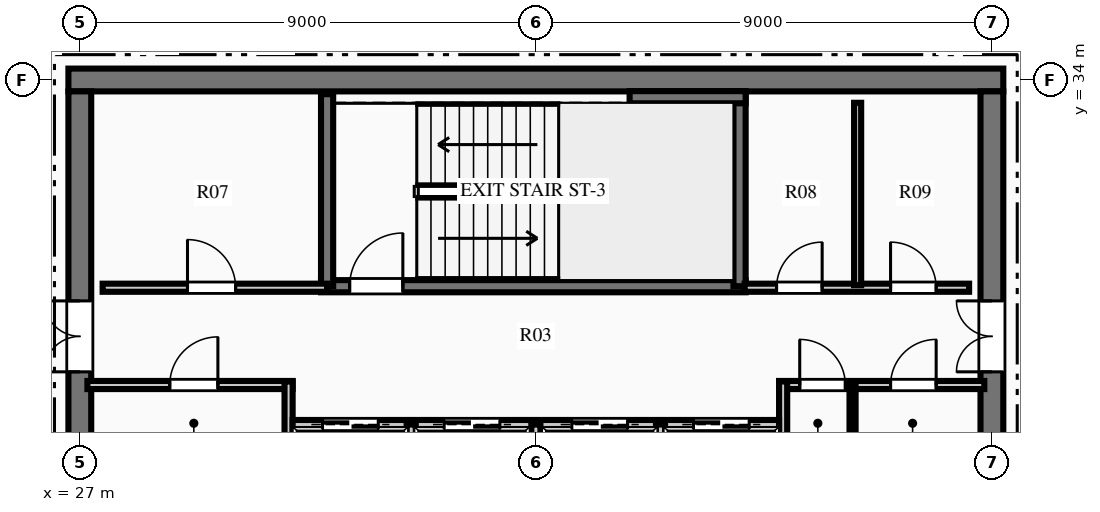
"""IFC4 building model, lengths in metres.
Left out: names, types, materials, properties, quantities, classifications, styles, units other than length and angle.
Written with IfcOpenShell. Run it as: python <this file> out.ifc"""

import sys

from ifc_helpers import new_model, si_unit, direction, frame, frame_2d, origin, place, context, subcontext, project, spatial, rectangle, extrude, element, fill, save


model = new_model("IFC4")
c1 = context("Model", 3, precision=1e-05, world=origin(), true_north=direction((0.0, 1.0)))
c2 = subcontext(c1, "Body", "Model", "MODEL_VIEW")
j1 = project(units=[si_unit("LENGTHUNIT", "METRE"), si_unit("PLANEANGLEUNIT", "RADIAN")], contexts=[c1])
p1 = place(None, origin())
s1 = spatial("IfcSite", under=j1, at=p1, CompositionType="ELEMENT")
p2 = place(p1, origin())
s2 = spatial("IfcBuilding", under=s1, at=p2, CompositionType="ELEMENT")
p3 = place(p2, frame((0.0, 0.0, 289.95)))
s3 = spatial("IfcBuildingStorey", under=s2, at=p3, CompositionType="ELEMENT", Elevation=289.95)
p4 = place(p3, frame((26.775, 34.0, 0.0), z_axis=(0.0, 0.0, 1.0), x_axis=(1.0, 0.0, 0.0)))
e1 = element("IfcWall", 1, at=p4, inside=s3, PredefinedType="SHEAR", context=c2, shape_type="SweptSolid", body=[
    extrude(rectangle(XDim=18.45, YDim=0.45, at=frame_2d((9.225, 0.0))), origin(), (0.0, 0.0, 1.0), 3.75),
])
p5 = place(p3, frame((27.0, 18.225, 0.0), z_axis=(0.0, 0.0, 1.0), x_axis=(0.0, 1.0, 0.0)))
e2 = element("IfcWall", 2, at=p5, inside=s3, PredefinedType="SHEAR", context=c2, shape_type="SweptSolid", body=[
    extrude(rectangle(XDim=15.55, YDim=0.45, at=frame_2d((7.775, 0.0))), origin(), (0.0, 0.0, 1.0), 3.75),
])
p6 = place(p5, frame((10.015, 0.0, 0.0)))
e3 = element("IfcOpeningElement", 3, at=p6, cuts=e2, PredefinedType="OPENING", context=c2, shape_type="SweptSolid", body=[
    extrude(rectangle(XDim=1.4, YDim=2.2, at=frame_2d((0.7, 1.1))), frame((0.0, 0.235, 0.0), z_axis=(0.0, -1.0, 0.0), x_axis=(1.0, 0.0, 0.0)), (0.0, 0.0, 1.0), 0.47),
])
p7 = place(p3, frame((45.0, 18.225, 0.0), z_axis=(0.0, 0.0, 1.0), x_axis=(0.0, 1.0, 0.0)))
e4 = element("IfcWall", 4, at=p7, inside=s3, PredefinedType="SHEAR", context=c2, shape_type="SweptSolid", body=[
    extrude(rectangle(XDim=15.55, YDim=0.45, at=frame_2d((7.775, 0.0))), origin(), (0.0, 0.0, 1.0), 3.75),
])
p8 = place(p7, frame((10.015, 0.0, 0.0)))
e5 = element("IfcOpeningElement", 5, at=p8, cuts=e4, PredefinedType="OPENING", context=c2, shape_type="SweptSolid", body=[
    extrude(rectangle(XDim=1.4, YDim=2.2, at=frame_2d((0.7, 1.1))), frame((0.0, 0.235, 0.0), z_axis=(0.0, -1.0, 0.0), x_axis=(1.0, 0.0, 0.0)), (0.0, 0.0, 1.0), 0.47),
])
p9 = place(p3, frame((31.76, 29.93, 0.0), z_axis=(0.0, 0.0, 1.0), x_axis=(1.0, 0.0, 0.0)))
e6 = element("IfcWall", 6, at=p9, inside=s3, PredefinedType="SHEAR", context=c2, shape_type="SweptSolid", body=[
    extrude(rectangle(XDim=8.38, YDim=0.24, at=frame_2d((4.19, 0.0))), origin(), (0.0, 0.0, 1.0), 3.75),
])
p10 = place(p9, frame((0.565, 0.0, 0.0)))
e7 = element("IfcOpeningElement", 7, at=p10, cuts=e6, PredefinedType="OPENING", context=c2, shape_type="SweptSolid", body=[
    extrude(rectangle(XDim=1.05, YDim=2.15, at=frame_2d((0.525, 1.075))), frame((0.0, 0.13, 0.0), z_axis=(0.0, -1.0, 0.0), x_axis=(1.0, 0.0, 0.0)), (0.0, 0.0, 1.0), 0.26),
])
p11 = place(p3, frame((31.88, 29.93, 0.0), z_axis=(0.0, 0.0, 1.0), x_axis=(0.0, 1.0, 0.0)))
e8 = element("IfcWall", 8, at=p11, inside=s3, PredefinedType="SHEAR", context=c2, shape_type="SweptSolid", body=[
    extrude(rectangle(XDim=3.79, YDim=0.24, at=frame_2d((1.895, 0.0))), origin(), (0.0, 0.0, 1.0), 3.75),
])
p12 = place(p3, frame((40.02, 29.93, 0.0), z_axis=(0.0, 0.0, 1.0), x_axis=(0.0, 1.0, 0.0)))
e9 = element("IfcWall", 9, at=p12, inside=s3, PredefinedType="SHEAR", context=c2, shape_type="SweptSolid", body=[
    extrude(rectangle(XDim=3.85, YDim=0.24, at=frame_2d((1.925, 0.0))), origin(), (0.0, 0.0, 1.0), 3.75),
])
p13 = place(p3, frame((37.85, 33.66, 0.0), z_axis=(0.0, 0.0, 1.0), x_axis=(1.0, 0.0, 0.0)))
e10 = element("IfcWall", 10, at=p13, inside=s3, PredefinedType="SHEAR", context=c2, shape_type="SweptSolid", body=[
    extrude(rectangle(XDim=2.29, YDim=0.24, at=frame_2d((1.145, 0.0))), origin(), (0.0, 0.0, 1.0), 3.75),
])
p14 = place(p3, frame((27.15, 27.98, 0.0), z_axis=(0.0, 0.0, 1.0), x_axis=(1.0, 0.0, 0.0)))
e11 = element("IfcWall", 11, at=p14, inside=s3, PredefinedType="PARTITIONING", context=c2, shape_type="SweptSolid", body=[
    extrude(rectangle(XDim=4.05, YDim=0.16, at=frame_2d((2.025, 0.0))), origin(), (0.0, 0.0, 1.0), 3.34),
])
p15 = place(p14, frame((1.625, 0.0, 0.0)))
e12 = element("IfcOpeningElement", 12, at=p15, cuts=e11, PredefinedType="OPENING", context=c2, shape_type="SweptSolid", body=[
    extrude(rectangle(XDim=0.95, YDim=2.15, at=frame_2d((0.475, 1.075))), frame((0.0, 0.09, 0.0), z_axis=(0.0, -1.0, 0.0), x_axis=(1.0, 0.0, 0.0)), (0.0, 0.0, 1.0), 0.18),
])
p16 = place(p3, frame((31.12, 26.54, 0.0), z_axis=(0.0, 0.0, 1.0), x_axis=(0.0, 1.0, 0.0)))
e13 = element("IfcWall", 13, at=p16, inside=s3, PredefinedType="PARTITIONING", context=c2, shape_type="SweptSolid", body=[
    extrude(rectangle(XDim=1.51, YDim=0.16, at=frame_2d((0.755, 0.0))), origin(), (0.0, 0.0, 1.0), 3.34),
])
p17 = place(p3, frame((40.8, 27.98, 0.0), z_axis=(0.0, 0.0, 1.0), x_axis=(1.0, 0.0, 0.0)))
e14 = element("IfcWall", 14, at=p17, inside=s3, PredefinedType="PARTITIONING", context=c2, shape_type="SweptSolid", body=[
    extrude(rectangle(XDim=4.05, YDim=0.16, at=frame_2d((2.025, 0.0))), origin(), (0.0, 0.0, 1.0), 3.34),
])
p18 = place(p17, frame((0.407, 0.0, 0.0)))
e15 = element("IfcOpeningElement", 15, at=p18, cuts=e14, PredefinedType="OPENING", context=c2, shape_type="SweptSolid", body=[
    extrude(rectangle(XDim=0.9, YDim=2.15, at=frame_2d((0.45, 1.075))), frame((0.0, 0.09, 0.0), z_axis=(0.0, -1.0, 0.0), x_axis=(1.0, 0.0, 0.0)), (0.0, 0.0, 1.0), 0.18),
])
p19 = place(p17, frame((2.2, 0.0, 0.0)))
e16 = element("IfcOpeningElement", 16, at=p19, cuts=e14, PredefinedType="OPENING", context=c2, shape_type="SweptSolid", body=[
    extrude(rectangle(XDim=0.9, YDim=2.15, at=frame_2d((0.45, 1.075))), frame((0.0, 0.09, 0.0), z_axis=(0.0, -1.0, 0.0), x_axis=(1.0, 0.0, 0.0)), (0.0, 0.0, 1.0), 0.18),
])
p20 = place(p3, frame((40.88, 26.54, 0.0), z_axis=(0.0, 0.0, 1.0), x_axis=(0.0, 1.0, 0.0)))
e17 = element("IfcWall", 17, at=p20, inside=s3, PredefinedType="PARTITIONING", context=c2, shape_type="SweptSolid", body=[
    extrude(rectangle(XDim=1.51, YDim=0.16, at=frame_2d((0.755, 0.0))), origin(), (0.0, 0.0, 1.0), 3.34),
])
p21 = place(p3, frame((42.25, 26.54, 0.0), z_axis=(0.0, 0.0, 1.0), x_axis=(0.0, 1.0, 0.0)))
e18 = element("IfcWall", 18, at=p21, inside=s3, PredefinedType="PARTITIONING", context=c2, shape_type="SweptSolid", body=[
    extrude(rectangle(XDim=1.44, YDim=0.12, at=frame_2d((0.72, 0.0))), origin(), (0.0, 0.0, 1.0), 3.34),
])
p22 = place(p3, frame((27.45, 29.9, 0.0), z_axis=(0.0, 0.0, 1.0), x_axis=(1.0, 0.0, 0.0)))
e19 = element("IfcWall", 19, at=p22, inside=s3, PredefinedType="PARTITIONING", context=c2, shape_type="SweptSolid", body=[
    extrude(rectangle(XDim=4.43, YDim=0.16, at=frame_2d((2.215, 0.0))), origin(), (0.0, 0.0, 1.0), 3.34),
])
p23 = place(p22, frame((1.675, 0.0, 0.0)))
e20 = element("IfcOpeningElement", 20, at=p23, cuts=e19, PredefinedType="OPENING", context=c2, shape_type="SweptSolid", body=[
    extrude(rectangle(XDim=0.95, YDim=2.15, at=frame_2d((0.475, 1.075))), frame((0.0, 0.09, 0.0), z_axis=(0.0, -1.0, 0.0), x_axis=(1.0, 0.0, 0.0)), (0.0, 0.0, 1.0), 0.18),
])
p24 = place(p3, frame((40.12, 29.9, 0.0), z_axis=(0.0, 0.0, 1.0), x_axis=(1.0, 0.0, 0.0)))
e21 = element("IfcWall", 21, at=p24, inside=s3, PredefinedType="PARTITIONING", context=c2, shape_type="SweptSolid", body=[
    extrude(rectangle(XDim=4.43, YDim=0.16, at=frame_2d((2.215, 0.0))), origin(), (0.0, 0.0, 1.0), 3.34),
])
p25 = place(p24, frame((0.63, 0.0, 0.0)))
e22 = element("IfcOpeningElement", 22, at=p25, cuts=e21, PredefinedType="OPENING", context=c2, shape_type="SweptSolid", body=[
    extrude(rectangle(XDim=0.9, YDim=2.15, at=frame_2d((0.45, 1.075))), frame((0.0, 0.09, 0.0), z_axis=(0.0, -1.0, 0.0), x_axis=(1.0, 0.0, 0.0)), (0.0, 0.0, 1.0), 0.18),
])
p26 = place(p24, frame((2.88, 0.0, 0.0)))
e23 = element("IfcOpeningElement", 23, at=p26, cuts=e21, PredefinedType="OPENING", context=c2, shape_type="SweptSolid", body=[
    extrude(rectangle(XDim=0.9, YDim=2.15, at=frame_2d((0.45, 1.075))), frame((0.0, 0.09, 0.0), z_axis=(0.0, -1.0, 0.0), x_axis=(1.0, 0.0, 0.0)), (0.0, 0.0, 1.0), 0.18),
])
p27 = place(p3, frame((42.35, 29.95, 0.0), z_axis=(0.0, 0.0, 1.0), x_axis=(0.0, 1.0, 0.0)))
e24 = element("IfcWall", 24, at=p27, inside=s3, PredefinedType="PARTITIONING", context=c2, shape_type="SweptSolid", body=[
    extrude(rectangle(XDim=3.6, YDim=0.14, at=frame_2d((1.8, 0.0))), origin(), (0.0, 0.0, 1.0), 3.34),
])
p28 = place(p3, frame((31.2, 27.2, 0.0), z_axis=(0.0, 0.0, 1.0), x_axis=(1.0, 0.0, 0.0)))
e25 = element("IfcWall", 25, at=p28, inside=s3, PredefinedType="PARTITIONING", context=c2, shape_type="SweptSolid", body=[
    extrude(rectangle(XDim=9.6, YDim=0.18, at=frame_2d((4.8, 0.0))), origin(), (0.0, 0.0, 1.0), 3.34),
])
p29 = place(p28, frame((0.59, 0.0, 0.0)))
e26 = element("IfcOpeningElement", 26, at=p29, cuts=e25, PredefinedType="OPENING", context=c2, shape_type="SweptSolid", body=[
    extrude(rectangle(XDim=1.1, YDim=2.15, at=frame_2d((0.55, 1.075))), frame((0.0, 0.1, 0.0), z_axis=(0.0, -1.0, 0.0), x_axis=(1.0, 0.0, 0.0)), (0.0, 0.0, 1.0), 0.2),
])
p30 = place(p28, frame((2.99, 0.0, 0.0)))
e27 = element("IfcOpeningElement", 27, at=p30, cuts=e25, PredefinedType="OPENING", context=c2, shape_type="SweptSolid", body=[
    extrude(rectangle(XDim=1.1, YDim=2.15, at=frame_2d((0.55, 1.075))), frame((0.0, 0.1, 0.0), z_axis=(0.0, -1.0, 0.0), x_axis=(1.0, 0.0, 0.0)), (0.0, 0.0, 1.0), 0.2),
])
p31 = place(p28, frame((5.51, 0.0, 0.0)))
e28 = element("IfcOpeningElement", 28, at=p31, cuts=e25, PredefinedType="OPENING", context=c2, shape_type="SweptSolid", body=[
    extrude(rectangle(XDim=1.1, YDim=2.15, at=frame_2d((0.55, 1.075))), frame((0.0, 0.1, 0.0), z_axis=(0.0, -1.0, 0.0), x_axis=(1.0, 0.0, 0.0)), (0.0, 0.0, 1.0), 0.2),
])
p32 = place(p28, frame((7.91, 0.0, 0.0)))
e29 = element("IfcOpeningElement", 29, at=p32, cuts=e25, PredefinedType="OPENING", context=c2, shape_type="SweptSolid", body=[
    extrude(rectangle(XDim=1.1, YDim=2.15, at=frame_2d((0.55, 1.075))), frame((0.0, 0.1, 0.0), z_axis=(0.0, -1.0, 0.0), x_axis=(1.0, 0.0, 0.0)), (0.0, 0.0, 1.0), 0.2),
])
for number, where, z_axis, x_axis in (
    (30, (33.54, 25.3, 0.0), (0.0, 0.0, 1.0), (0.0, 1.0, 0.0)),
    (31, (36.0, 25.3, 0.0), (0.0, 0.0, 1.0), (0.0, 1.0, 0.0)),
    (32, (38.46, 25.3, 0.0), (0.0, 0.0, 1.0), (0.0, 1.0, 0.0)),
):
    element("IfcWall", number, at=place(p3, frame(where, z_axis=z_axis, x_axis=x_axis)), inside=s3, PredefinedType="PARTITIONING", context=c2, shape_type="SweptSolid", body=[
        extrude(rectangle(XDim=1.9, YDim=0.18, at=frame_2d((0.95, 0.0))), origin(), (0.0, 0.0, 1.0), 3.34),
    ])
p33 = place(p15, origin())
e33 = element("IfcDoor", 33, at=p33, inside=s3, OperationType="SINGLE_SWING_RIGHT", PredefinedType="DOOR", context=c2, shape_type="SweptSolid", body=[
    extrude(rectangle(XDim=0.95, YDim=2.15, at=frame_2d((0.475, 1.075))), frame((0.0, 0.025, 0.0), z_axis=(0.0, -1.0, 0.0), x_axis=(1.0, 0.0, 0.0)), (0.0, 0.0, 1.0), 0.05),
])
fill(e12, e33)
p34 = place(p18, origin())
e34 = element("IfcDoor", 34, at=p34, inside=s3, OperationType="SINGLE_SWING_LEFT", PredefinedType="DOOR", context=c2, shape_type="SweptSolid", body=[
    extrude(rectangle(XDim=0.9, YDim=2.15, at=frame_2d((0.45, 1.075))), frame((0.0, 0.025, 0.0), z_axis=(0.0, -1.0, 0.0), x_axis=(1.0, 0.0, 0.0)), (0.0, 0.0, 1.0), 0.05),
])
fill(e15, e34)
p35 = place(p19, origin())
e35 = element("IfcDoor", 35, at=p35, inside=s3, OperationType="SINGLE_SWING_RIGHT", PredefinedType="DOOR", context=c2, shape_type="SweptSolid", body=[
    extrude(rectangle(XDim=0.9, YDim=2.15, at=frame_2d((0.45, 1.075))), frame((0.0, 0.025, 0.0), z_axis=(0.0, -1.0, 0.0), x_axis=(1.0, 0.0, 0.0)), (0.0, 0.0, 1.0), 0.05),
])
fill(e16, e35)
p36 = place(p23, origin())
e36 = element("IfcDoor", 36, at=p36, inside=s3, OperationType="SINGLE_SWING_LEFT", PredefinedType="DOOR", context=c2, shape_type="SweptSolid", body=[
    extrude(rectangle(XDim=0.95, YDim=2.15, at=frame_2d((0.475, 1.075))), frame((0.0, 0.025, 0.0), z_axis=(0.0, -1.0, 0.0), x_axis=(1.0, 0.0, 0.0)), (0.0, 0.0, 1.0), 0.05),
])
fill(e20, e36)
p37 = place(p25, origin())
e37 = element("IfcDoor", 37, at=p37, inside=s3, OperationType="SINGLE_SWING_RIGHT", PredefinedType="DOOR", context=c2, shape_type="SweptSolid", body=[
    extrude(rectangle(XDim=0.9, YDim=2.15, at=frame_2d((0.45, 1.075))), frame((0.0, 0.025, 0.0), z_axis=(0.0, -1.0, 0.0), x_axis=(1.0, 0.0, 0.0)), (0.0, 0.0, 1.0), 0.05),
])
fill(e22, e37)
p38 = place(p26, origin())
e38 = element("IfcDoor", 38, at=p38, inside=s3, OperationType="SINGLE_SWING_LEFT", PredefinedType="DOOR", context=c2, shape_type="SweptSolid", body=[
    extrude(rectangle(XDim=0.9, YDim=2.15, at=frame_2d((0.45, 1.075))), frame((0.0, 0.025, 0.0), z_axis=(0.0, -1.0, 0.0), x_axis=(1.0, 0.0, 0.0)), (0.0, 0.0, 1.0), 0.05),
])
fill(e23, e38)
p39 = place(p10, origin())
e39 = element("IfcDoor", 39, at=p39, inside=s3, OperationType="SINGLE_SWING_RIGHT", PredefinedType="DOOR", context=c2, shape_type="SweptSolid", body=[
    extrude(rectangle(XDim=1.05, YDim=2.15, at=frame_2d((0.525, 1.075))), frame((0.0, 0.025, 0.0), z_axis=(0.0, -1.0, 0.0), x_axis=(1.0, 0.0, 0.0)), (0.0, 0.0, 1.0), 0.05),
])
fill(e7, e39)
p40 = place(p6, origin())
e40 = element("IfcDoor", 40, at=p40, inside=s3, OperationType="DOUBLE_DOOR_SINGLE_SWING", PredefinedType="DOOR", context=c2, shape_type="SweptSolid", body=[
    extrude(rectangle(XDim=1.4, YDim=2.2, at=frame_2d((0.7, 1.1))), frame((0.0, 0.025, 0.0), z_axis=(0.0, -1.0, 0.0), x_axis=(1.0, 0.0, 0.0)), (0.0, 0.0, 1.0), 0.05),
])
fill(e3, e40)
p41 = place(p8, origin())
e41 = element("IfcDoor", 41, at=p41, inside=s3, OperationType="DOUBLE_DOOR_SINGLE_SWING", PredefinedType="DOOR", context=c2, shape_type="SweptSolid", body=[
    extrude(rectangle(XDim=1.4, YDim=2.2, at=frame_2d((0.7, 1.1))), frame((0.0, 0.025, 0.0), z_axis=(0.0, -1.0, 0.0), x_axis=(1.0, 0.0, 0.0)), (0.0, 0.0, 1.0), 0.05),
])
fill(e5, e41)
p42 = place(p29, origin())
e42 = element("IfcDoor", 42, at=p42, inside=s3, OperationType="SLIDING_TO_LEFT", PredefinedType="DOOR", context=c2, shape_type="SweptSolid", body=[
    extrude(rectangle(XDim=1.1, YDim=2.15, at=frame_2d((0.55, 1.075))), frame((0.0, 0.025, 0.0), z_axis=(0.0, -1.0, 0.0), x_axis=(1.0, 0.0, 0.0)), (0.0, 0.0, 1.0), 0.05),
])
fill(e26, e42)
p43 = place(p30, origin())
e43 = element("IfcDoor", 43, at=p43, inside=s3, OperationType="SLIDING_TO_LEFT", PredefinedType="DOOR", context=c2, shape_type="SweptSolid", body=[
    extrude(rectangle(XDim=1.1, YDim=2.15, at=frame_2d((0.55, 1.075))), frame((0.0, 0.025, 0.0), z_axis=(0.0, -1.0, 0.0), x_axis=(1.0, 0.0, 0.0)), (0.0, 0.0, 1.0), 0.05),
])
fill(e27, e43)
p44 = place(p31, origin())
e44 = element("IfcDoor", 44, at=p44, inside=s3, OperationType="SLIDING_TO_LEFT", PredefinedType="DOOR", context=c2, shape_type="SweptSolid", body=[
    extrude(rectangle(XDim=1.1, YDim=2.15, at=frame_2d((0.55, 1.075))), frame((0.0, 0.025, 0.0), z_axis=(0.0, -1.0, 0.0), x_axis=(1.0, 0.0, 0.0)), (0.0, 0.0, 1.0), 0.05),
])
fill(e28, e44)
p45 = place(p32, origin())
e45 = element("IfcDoor", 45, at=p45, inside=s3, OperationType="SLIDING_TO_LEFT", PredefinedType="DOOR", context=c2, shape_type="SweptSolid", body=[
    extrude(rectangle(XDim=1.1, YDim=2.15, at=frame_2d((0.55, 1.075))), frame((0.0, 0.025, 0.0), z_axis=(0.0, -1.0, 0.0), x_axis=(1.0, 0.0, 0.0)), (0.0, 0.0, 1.0), 0.05),
])
fill(e29, e45)
save(model, sys.argv[1])
